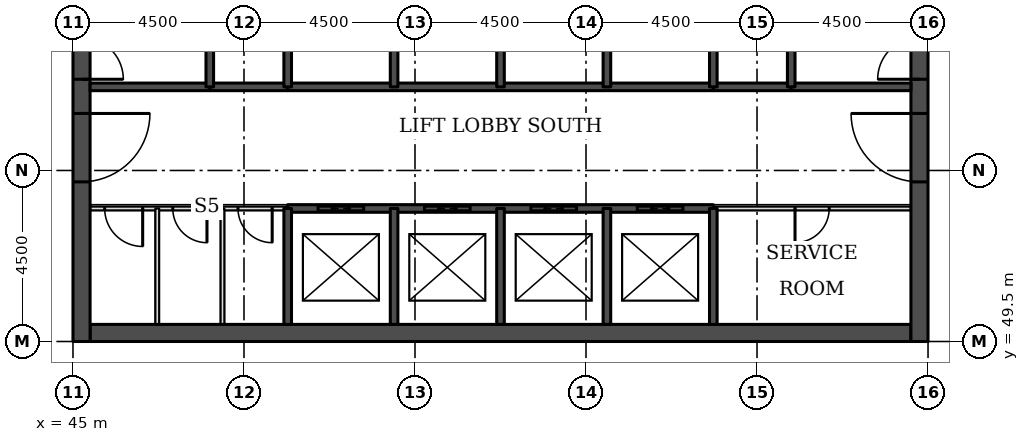
"""IFC4 building model, lengths in metres.
Left out: names, types, materials, properties, quantities, classifications, styles, units other than length and angle.
Written with IfcOpenShell. Run it as: python <this file> out.ifc"""

import sys

from ifc_helpers import new_model, si_unit, direction, frame, frame_2d, origin, place, context, subcontext, project, spatial, rectangle, extrude, element, fill, save


model = new_model("IFC4")
c1 = context("Model", 3, precision=1e-05, world=origin(), true_north=direction((0.0, 1.0)))
c2 = subcontext(c1, "Body", "Model", "MODEL_VIEW")
j1 = project(units=[si_unit("LENGTHUNIT", "METRE"), si_unit("PLANEANGLEUNIT", "RADIAN")], contexts=[c1])
p1 = place(None, origin())
s1 = spatial("IfcSite", under=j1, at=p1, CompositionType="ELEMENT")
p2 = place(p1, origin())
s2 = spatial("IfcBuilding", under=s1, at=p2, CompositionType="ELEMENT")
p3 = place(p2, frame((0.0, 0.0, 97.4)))
s3 = spatial("IfcBuildingStorey", under=s2, at=p3, CompositionType="ELEMENT", Elevation=97.4)
p4 = place(p3, frame((45.45, 49.725, 0.0), z_axis=(0.0, 0.0, 1.0), x_axis=(1.0, 0.0, 0.0)))
e1 = element("IfcWall", 1, at=p4, inside=s3, PredefinedType="SHEAR", context=c2, shape_type="SweptSolid", body=[
    extrude(rectangle(XDim=21.6, YDim=0.45, at=frame_2d((10.8, 0.0))), origin(), (0.0, 0.0, 1.0), 3.7),
])
p5 = place(p3, frame((45.225, 49.5, 0.0), z_axis=(0.0, 0.0, 1.0), x_axis=(0.0, 1.0, 0.0)))
e2 = element("IfcWall", 2, at=p5, inside=s3, PredefinedType="SHEAR", context=c2, shape_type="SweptSolid", body=[
    extrude(rectangle(XDim=22.5, YDim=0.45, at=frame_2d((11.25, 0.0))), origin(), (0.0, 0.0, 1.0), 3.7),
])
p6 = place(p5, frame((4.2, 0.0, 0.0)))
e3 = element("IfcOpeningElement", 3, at=p6, cuts=e2, PredefinedType="OPENING", context=c2, shape_type="SweptSolid", body=[
    extrude(rectangle(XDim=1.8, YDim=2.1, at=frame_2d((0.9, 1.05))), frame((0.0, 0.235, 0.0), z_axis=(0.0, -1.0, 0.0), x_axis=(1.0, 0.0, 0.0)), (0.0, 0.0, 1.0), 0.47),
])
p7 = place(p5, frame((6.9, 0.0, 0.0)))
e4 = element("IfcOpeningElement", 4, at=p7, cuts=e2, PredefinedType="OPENING", context=c2, shape_type="SweptSolid", body=[
    extrude(rectangle(XDim=1.1, YDim=2.1, at=frame_2d((0.55, 1.05))), frame((0.0, 0.235, 0.0), z_axis=(0.0, -1.0, 0.0), x_axis=(1.0, 0.0, 0.0)), (0.0, 0.0, 1.0), 0.47),
])
p8 = place(p5, frame((13.6, 0.0, 0.0)))
e5 = element("IfcOpeningElement", 5, at=p8, cuts=e2, PredefinedType="OPENING", context=c2, shape_type="SweptSolid", body=[
    extrude(rectangle(XDim=1.1, YDim=2.1, at=frame_2d((0.55, 1.05))), frame((0.0, 0.235, 0.0), z_axis=(0.0, -1.0, 0.0), x_axis=(1.0, 0.0, 0.0)), (0.0, 0.0, 1.0), 0.47),
])
p9 = place(p5, frame((16.5, 0.0, 0.0)))
e6 = element("IfcOpeningElement", 6, at=p9, cuts=e2, PredefinedType="OPENING", context=c2, shape_type="SweptSolid", body=[
    extrude(rectangle(XDim=1.8, YDim=2.1, at=frame_2d((0.9, 1.05))), frame((0.0, 0.235, 0.0), z_axis=(0.0, -1.0, 0.0), x_axis=(1.0, 0.0, 0.0)), (0.0, 0.0, 1.0), 0.47),
])
p10 = place(p3, frame((67.275, 49.5, 0.0), z_axis=(0.0, 0.0, 1.0), x_axis=(0.0, 1.0, 0.0)))
e7 = element("IfcWall", 7, at=p10, inside=s3, PredefinedType="SHEAR", context=c2, shape_type="SweptSolid", body=[
    extrude(rectangle(XDim=22.5, YDim=0.45, at=frame_2d((11.25, 0.0))), origin(), (0.0, 0.0, 1.0), 3.7),
])
p11 = place(p10, frame((4.2, 0.0, 0.0)))
e8 = element("IfcOpeningElement", 8, at=p11, cuts=e7, PredefinedType="OPENING", context=c2, shape_type="SweptSolid", body=[
    extrude(rectangle(XDim=1.8, YDim=2.1, at=frame_2d((0.9, 1.05))), frame((0.0, 0.235, 0.0), z_axis=(0.0, -1.0, 0.0), x_axis=(1.0, 0.0, 0.0)), (0.0, 0.0, 1.0), 0.47),
])
p12 = place(p10, frame((6.9, 0.0, 0.0)))
e9 = element("IfcOpeningElement", 9, at=p12, cuts=e7, PredefinedType="OPENING", context=c2, shape_type="SweptSolid", body=[
    extrude(rectangle(XDim=1.1, YDim=2.1, at=frame_2d((0.55, 1.05))), frame((0.0, 0.235, 0.0), z_axis=(0.0, -1.0, 0.0), x_axis=(1.0, 0.0, 0.0)), (0.0, 0.0, 1.0), 0.47),
])
p13 = place(p10, frame((13.6, 0.0, 0.0)))
e10 = element("IfcOpeningElement", 10, at=p13, cuts=e7, PredefinedType="OPENING", context=c2, shape_type="SweptSolid", body=[
    extrude(rectangle(XDim=1.1, YDim=2.1, at=frame_2d((0.55, 1.05))), frame((0.0, 0.235, 0.0), z_axis=(0.0, -1.0, 0.0), x_axis=(1.0, 0.0, 0.0)), (0.0, 0.0, 1.0), 0.47),
])
p14 = place(p10, frame((16.5, 0.0, 0.0)))
e11 = element("IfcOpeningElement", 11, at=p14, cuts=e7, PredefinedType="OPENING", context=c2, shape_type="SweptSolid", body=[
    extrude(rectangle(XDim=1.8, YDim=2.1, at=frame_2d((0.9, 1.05))), frame((0.0, 0.235, 0.0), z_axis=(0.0, -1.0, 0.0), x_axis=(1.0, 0.0, 0.0)), (0.0, 0.0, 1.0), 0.47),
])
p15 = place(p3, frame((45.45, 53.0, 0.0), z_axis=(0.0, 0.0, 1.0), x_axis=(1.0, 0.0, 0.0)))
e12 = element("IfcWall", 12, at=p15, inside=s3, PredefinedType="PARTITIONING", context=c2, shape_type="SweptSolid", body=[
    extrude(rectangle(XDim=5.2, YDim=0.1, at=frame_2d((2.6, 0.0))), origin(), (0.0, 0.0, 1.0), 3.55),
])
p16 = place(p15, frame((0.384, 0.0, 0.0)))
e13 = element("IfcOpeningElement", 13, at=p16, cuts=e12, PredefinedType="OPENING", context=c2, shape_type="SweptSolid", body=[
    extrude(rectangle(XDim=1.0, YDim=2.1, at=frame_2d((0.5, 1.05))), frame((0.0, 0.06, 0.0), z_axis=(0.0, -1.0, 0.0), x_axis=(1.0, 0.0, 0.0)), (0.0, 0.0, 1.0), 0.12),
])
p17 = place(p15, frame((2.176, 0.0, 0.0)))
e14 = element("IfcOpeningElement", 14, at=p17, cuts=e12, PredefinedType="OPENING", context=c2, shape_type="SweptSolid", body=[
    extrude(rectangle(XDim=0.9, YDim=2.1, at=frame_2d((0.45, 1.05))), frame((0.0, 0.06, 0.0), z_axis=(0.0, -1.0, 0.0), x_axis=(1.0, 0.0, 0.0)), (0.0, 0.0, 1.0), 0.12),
])
p18 = place(p15, frame((3.892, 0.0, 0.0)))
e15 = element("IfcOpeningElement", 15, at=p18, cuts=e12, PredefinedType="OPENING", context=c2, shape_type="SweptSolid", body=[
    extrude(rectangle(XDim=0.9, YDim=2.1, at=frame_2d((0.45, 1.05))), frame((0.0, 0.06, 0.0), z_axis=(0.0, -1.0, 0.0), x_axis=(1.0, 0.0, 0.0)), (0.0, 0.0, 1.0), 0.12),
])
p19 = place(p3, frame((61.85, 53.0, 0.0), z_axis=(0.0, 0.0, 1.0), x_axis=(1.0, 0.0, 0.0)))
e16 = element("IfcWall", 16, at=p19, inside=s3, PredefinedType="PARTITIONING", context=c2, shape_type="SweptSolid", body=[
    extrude(rectangle(XDim=5.2, YDim=0.1, at=frame_2d((2.6, 0.0))), origin(), (0.0, 0.0, 1.0), 3.55),
])
p20 = place(p19, frame((2.15, 0.0, 0.0)))
e17 = element("IfcOpeningElement", 17, at=p20, cuts=e16, PredefinedType="OPENING", context=c2, shape_type="SweptSolid", body=[
    extrude(rectangle(XDim=0.9, YDim=2.1, at=frame_2d((0.45, 1.05))), frame((0.0, 0.06, 0.0), z_axis=(0.0, -1.0, 0.0), x_axis=(1.0, 0.0, 0.0)), (0.0, 0.0, 1.0), 0.12),
])
p21 = place(p3, frame((50.65, 53.0, 0.0), z_axis=(0.0, 0.0, 1.0), x_axis=(1.0, 0.0, 0.0)))
e18 = element("IfcWall", 18, at=p21, inside=s3, PredefinedType="SOLIDWALL", context=c2, shape_type="SweptSolid", body=[
    extrude(rectangle(XDim=11.2, YDim=0.2, at=frame_2d((5.6, 0.0))), origin(), (0.0, 0.0, 1.0), 3.55),
])
p22 = place(p21, frame((0.8, 0.0, 0.0)))
e19 = element("IfcOpeningElement", 19, at=p22, cuts=e18, PredefinedType="OPENING", context=c2, shape_type="SweptSolid", body=[
    extrude(rectangle(XDim=1.2, YDim=2.1, at=frame_2d((0.6, 1.05))), frame((0.0, 0.11, 0.0), z_axis=(0.0, -1.0, 0.0), x_axis=(1.0, 0.0, 0.0)), (0.0, 0.0, 1.0), 0.22),
])
p23 = place(p21, frame((3.6, 0.0, 0.0)))
e20 = element("IfcOpeningElement", 20, at=p23, cuts=e18, PredefinedType="OPENING", context=c2, shape_type="SweptSolid", body=[
    extrude(rectangle(XDim=1.2, YDim=2.1, at=frame_2d((0.6, 1.05))), frame((0.0, 0.11, 0.0), z_axis=(0.0, -1.0, 0.0), x_axis=(1.0, 0.0, 0.0)), (0.0, 0.0, 1.0), 0.22),
])
p24 = place(p21, frame((6.4, 0.0, 0.0)))
e21 = element("IfcOpeningElement", 21, at=p24, cuts=e18, PredefinedType="OPENING", context=c2, shape_type="SweptSolid", body=[
    extrude(rectangle(XDim=1.2, YDim=2.1, at=frame_2d((0.6, 1.05))), frame((0.0, 0.11, 0.0), z_axis=(0.0, -1.0, 0.0), x_axis=(1.0, 0.0, 0.0)), (0.0, 0.0, 1.0), 0.22),
])
p25 = place(p21, frame((9.2, 0.0, 0.0)))
e22 = element("IfcOpeningElement", 22, at=p25, cuts=e18, PredefinedType="OPENING", context=c2, shape_type="SweptSolid", body=[
    extrude(rectangle(XDim=1.2, YDim=2.1, at=frame_2d((0.6, 1.05))), frame((0.0, 0.11, 0.0), z_axis=(0.0, -1.0, 0.0), x_axis=(1.0, 0.0, 0.0)), (0.0, 0.0, 1.0), 0.22),
])
for number, where, z_axis, x_axis in (
    (23, (48.6, 56.2, 0.0), (0.0, 0.0, 1.0), (1.0, 0.0, 0.0)),
    (24, (61.85, 56.2, 0.0), (0.0, 0.0, 1.0), (1.0, 0.0, 0.0)),
):
    element("IfcWall", number, at=place(p3, frame(where, z_axis=z_axis, x_axis=x_axis)), inside=s3, PredefinedType="SOLIDWALL", context=c2, shape_type="SweptSolid", body=[
        extrude(rectangle(XDim=2.05, YDim=0.2, at=frame_2d((1.025, 0.0))), origin(), (0.0, 0.0, 1.0), 3.55),
    ])
p26 = place(p3, frame((45.45, 56.2, 0.0), z_axis=(0.0, 0.0, 1.0), x_axis=(1.0, 0.0, 0.0)))
e25 = element("IfcWall", 25, at=p26, inside=s3, PredefinedType="SOLIDWALL", context=c2, shape_type="SweptSolid", body=[
    extrude(rectangle(XDim=3.15, YDim=0.2, at=frame_2d((1.575, 0.0))), origin(), (0.0, 0.0, 1.0), 3.55),
])
p27 = place(p3, frame((50.65, 56.2, 0.0), z_axis=(0.0, 0.0, 1.0), x_axis=(1.0, 0.0, 0.0)))
e26 = element("IfcWall", 26, at=p27, inside=s3, PredefinedType="SOLIDWALL", context=c2, shape_type="SweptSolid", body=[
    extrude(rectangle(XDim=11.2, YDim=0.2, at=frame_2d((5.6, 0.0))), origin(), (0.0, 0.0, 1.0), 3.55),
])
p28 = place(p3, frame((63.9, 56.2, 0.0), z_axis=(0.0, 0.0, 1.0), x_axis=(1.0, 0.0, 0.0)))
e27 = element("IfcWall", 27, at=p28, inside=s3, PredefinedType="SOLIDWALL", context=c2, shape_type="SweptSolid", body=[
    extrude(rectangle(XDim=3.15, YDim=0.2, at=frame_2d((1.575, 0.0))), origin(), (0.0, 0.0, 1.0), 3.55),
])
p29 = place(p3, frame((47.218, 49.95, 0.0), z_axis=(0.0, 0.0, 1.0), x_axis=(0.0, 1.0, 0.0)))
e28 = element("IfcWall", 28, at=p29, inside=s3, PredefinedType="PARTITIONING", context=c2, shape_type="SweptSolid", body=[
    extrude(rectangle(XDim=3.05, YDim=0.1, at=frame_2d((1.525, 0.0))), origin(), (0.0, 0.0, 1.0), 3.55),
])
p30 = place(p3, frame((48.6, 56.2, 0.0), z_axis=(0.0, 0.0, 1.0), x_axis=(0.0, 1.0, 0.0)))
e29 = element("IfcWall", 29, at=p30, inside=s3, PredefinedType="SOLIDWALL", context=c2, shape_type="SweptSolid", body=[
    extrude(rectangle(XDim=5.8, YDim=0.2, at=frame_2d((2.9, 0.0))), origin(), (0.0, 0.0, 1.0), 3.55),
])
p31 = place(p3, frame((48.934, 49.95, 0.0), z_axis=(0.0, 0.0, 1.0), x_axis=(0.0, 1.0, 0.0)))
e30 = element("IfcWall", 30, at=p31, inside=s3, PredefinedType="PARTITIONING", context=c2, shape_type="SweptSolid", body=[
    extrude(rectangle(XDim=3.05, YDim=0.1, at=frame_2d((1.525, 0.0))), origin(), (0.0, 0.0, 1.0), 3.55),
])
p32 = place(p3, frame((50.65, 49.95, 0.0), z_axis=(0.0, 0.0, 1.0), x_axis=(0.0, 1.0, 0.0)))
e31 = element("IfcWall", 31, at=p32, inside=s3, PredefinedType="SOLIDWALL", context=c2, shape_type="SweptSolid", body=[
    extrude(rectangle(XDim=3.05, YDim=0.2, at=frame_2d((1.525, 0.0))), origin(), (0.0, 0.0, 1.0), 3.55),
])
p33 = place(p3, frame((50.65, 56.2, 0.0), z_axis=(0.0, 0.0, 1.0), x_axis=(0.0, 1.0, 0.0)))
e32 = element("IfcWall", 32, at=p33, inside=s3, PredefinedType="SOLIDWALL", context=c2, shape_type="SweptSolid", body=[
    extrude(rectangle(XDim=2.8, YDim=0.2, at=frame_2d((1.4, 0.0))), origin(), (0.0, 0.0, 1.0), 3.55),
])
p34 = place(p3, frame((53.45, 49.95, 0.0), z_axis=(0.0, 0.0, 1.0), x_axis=(0.0, 1.0, 0.0)))
e33 = element("IfcWall", 33, at=p34, inside=s3, PredefinedType="SOLIDWALL", context=c2, shape_type="SweptSolid", body=[
    extrude(rectangle(XDim=3.05, YDim=0.2, at=frame_2d((1.525, 0.0))), origin(), (0.0, 0.0, 1.0), 3.55),
])
p35 = place(p3, frame((53.45, 56.2, 0.0), z_axis=(0.0, 0.0, 1.0), x_axis=(0.0, 1.0, 0.0)))
e34 = element("IfcWall", 34, at=p35, inside=s3, PredefinedType="SOLIDWALL", context=c2, shape_type="SweptSolid", body=[
    extrude(rectangle(XDim=2.8, YDim=0.2, at=frame_2d((1.4, 0.0))), origin(), (0.0, 0.0, 1.0), 3.55),
])
p36 = place(p3, frame((56.25, 49.95, 0.0), z_axis=(0.0, 0.0, 1.0), x_axis=(0.0, 1.0, 0.0)))
e35 = element("IfcWall", 35, at=p36, inside=s3, PredefinedType="SOLIDWALL", context=c2, shape_type="SweptSolid", body=[
    extrude(rectangle(XDim=3.05, YDim=0.2, at=frame_2d((1.525, 0.0))), origin(), (0.0, 0.0, 1.0), 3.55),
])
p37 = place(p3, frame((56.25, 56.2, 0.0), z_axis=(0.0, 0.0, 1.0), x_axis=(0.0, 1.0, 0.0)))
e36 = element("IfcWall", 36, at=p37, inside=s3, PredefinedType="SOLIDWALL", context=c2, shape_type="SweptSolid", body=[
    extrude(rectangle(XDim=2.8, YDim=0.2, at=frame_2d((1.4, 0.0))), origin(), (0.0, 0.0, 1.0), 3.55),
])
p38 = place(p3, frame((59.05, 49.95, 0.0), z_axis=(0.0, 0.0, 1.0), x_axis=(0.0, 1.0, 0.0)))
e37 = element("IfcWall", 37, at=p38, inside=s3, PredefinedType="SOLIDWALL", context=c2, shape_type="SweptSolid", body=[
    extrude(rectangle(XDim=3.05, YDim=0.2, at=frame_2d((1.525, 0.0))), origin(), (0.0, 0.0, 1.0), 3.55),
])
p39 = place(p3, frame((59.05, 56.2, 0.0), z_axis=(0.0, 0.0, 1.0), x_axis=(0.0, 1.0, 0.0)))
e38 = element("IfcWall", 38, at=p39, inside=s3, PredefinedType="SOLIDWALL", context=c2, shape_type="SweptSolid", body=[
    extrude(rectangle(XDim=2.8, YDim=0.2, at=frame_2d((1.4, 0.0))), origin(), (0.0, 0.0, 1.0), 3.55),
])
p40 = place(p3, frame((61.85, 49.95, 0.0), z_axis=(0.0, 0.0, 1.0), x_axis=(0.0, 1.0, 0.0)))
e39 = element("IfcWall", 39, at=p40, inside=s3, PredefinedType="SOLIDWALL", context=c2, shape_type="SweptSolid", body=[
    extrude(rectangle(XDim=3.05, YDim=0.2, at=frame_2d((1.525, 0.0))), origin(), (0.0, 0.0, 1.0), 3.55),
])
p41 = place(p3, frame((61.85, 56.2, 0.0), z_axis=(0.0, 0.0, 1.0), x_axis=(0.0, 1.0, 0.0)))
e40 = element("IfcWall", 40, at=p41, inside=s3, PredefinedType="SOLIDWALL", context=c2, shape_type="SweptSolid", body=[
    extrude(rectangle(XDim=2.8, YDim=0.2, at=frame_2d((1.4, 0.0))), origin(), (0.0, 0.0, 1.0), 3.55),
])
p42 = place(p3, frame((63.9, 56.2, 0.0), z_axis=(0.0, 0.0, 1.0), x_axis=(0.0, 1.0, 0.0)))
e41 = element("IfcWall", 41, at=p42, inside=s3, PredefinedType="SOLIDWALL", context=c2, shape_type="SweptSolid", body=[
    extrude(rectangle(XDim=5.8, YDim=0.2, at=frame_2d((2.9, 0.0))), origin(), (0.0, 0.0, 1.0), 3.55),
])
p43 = place(p22, origin())
e42 = element("IfcDoor", 42, at=p43, inside=s3, OperationType="DOUBLE_DOOR_SLIDING", PredefinedType="DOOR", context=c2, shape_type="SweptSolid", body=[
    extrude(rectangle(XDim=1.2, YDim=2.1, at=frame_2d((0.6, 1.05))), frame((0.0, 0.025, 0.0), z_axis=(0.0, -1.0, 0.0), x_axis=(1.0, 0.0, 0.0)), (0.0, 0.0, 1.0), 0.05),
])
fill(e19, e42)
p44 = place(p23, origin())
e43 = element("IfcDoor", 43, at=p44, inside=s3, OperationType="DOUBLE_DOOR_SLIDING", PredefinedType="DOOR", context=c2, shape_type="SweptSolid", body=[
    extrude(rectangle(XDim=1.2, YDim=2.1, at=frame_2d((0.6, 1.05))), frame((0.0, 0.025, 0.0), z_axis=(0.0, -1.0, 0.0), x_axis=(1.0, 0.0, 0.0)), (0.0, 0.0, 1.0), 0.05),
])
fill(e20, e43)
p45 = place(p24, origin())
e44 = element("IfcDoor", 44, at=p45, inside=s3, OperationType="DOUBLE_DOOR_SLIDING", PredefinedType="DOOR", context=c2, shape_type="SweptSolid", body=[
    extrude(rectangle(XDim=1.2, YDim=2.1, at=frame_2d((0.6, 1.05))), frame((0.0, 0.025, 0.0), z_axis=(0.0, -1.0, 0.0), x_axis=(1.0, 0.0, 0.0)), (0.0, 0.0, 1.0), 0.05),
])
fill(e21, e44)
p46 = place(p25, origin())
e45 = element("IfcDoor", 45, at=p46, inside=s3, OperationType="DOUBLE_DOOR_SLIDING", PredefinedType="DOOR", context=c2, shape_type="SweptSolid", body=[
    extrude(rectangle(XDim=1.2, YDim=2.1, at=frame_2d((0.6, 1.05))), frame((0.0, 0.025, 0.0), z_axis=(0.0, -1.0, 0.0), x_axis=(1.0, 0.0, 0.0)), (0.0, 0.0, 1.0), 0.05),
])
fill(e22, e45)
p47 = place(p6, frame((1.8, 0.0, 0.0), z_axis=(0.0, 0.0, 1.0), x_axis=(-1.0, 0.0, 0.0)))
e46 = element("IfcDoor", 46, at=p47, inside=s3, OperationType="SINGLE_SWING_LEFT", PredefinedType="DOOR", context=c2, shape_type="SweptSolid", body=[
    extrude(rectangle(XDim=1.8, YDim=2.1, at=frame_2d((0.9, 1.05))), frame((0.0, 0.025, 0.0), z_axis=(0.0, -1.0, 0.0), x_axis=(1.0, 0.0, 0.0)), (0.0, 0.0, 1.0), 0.05),
])
fill(e3, e46)
p48 = place(p7, frame((1.1, 0.0, 0.0), z_axis=(0.0, 0.0, 1.0), x_axis=(-1.0, 0.0, 0.0)))
e47 = element("IfcDoor", 47, at=p48, inside=s3, OperationType="SINGLE_SWING_RIGHT", PredefinedType="DOOR", context=c2, shape_type="SweptSolid", body=[
    extrude(rectangle(XDim=1.1, YDim=2.1, at=frame_2d((0.55, 1.05))), frame((0.0, 0.025, 0.0), z_axis=(0.0, -1.0, 0.0), x_axis=(1.0, 0.0, 0.0)), (0.0, 0.0, 1.0), 0.05),
])
fill(e4, e47)
p49 = place(p11, origin())
e48 = element("IfcDoor", 48, at=p49, inside=s3, OperationType="SINGLE_SWING_RIGHT", PredefinedType="DOOR", context=c2, shape_type="SweptSolid", body=[
    extrude(rectangle(XDim=1.8, YDim=2.1, at=frame_2d((0.9, 1.05))), frame((0.0, 0.025, 0.0), z_axis=(0.0, -1.0, 0.0), x_axis=(1.0, 0.0, 0.0)), (0.0, 0.0, 1.0), 0.05),
])
fill(e8, e48)
p50 = place(p12, origin())
e49 = element("IfcDoor", 49, at=p50, inside=s3, OperationType="SINGLE_SWING_LEFT", PredefinedType="DOOR", context=c2, shape_type="SweptSolid", body=[
    extrude(rectangle(XDim=1.1, YDim=2.1, at=frame_2d((0.55, 1.05))), frame((0.0, 0.025, 0.0), z_axis=(0.0, -1.0, 0.0), x_axis=(1.0, 0.0, 0.0)), (0.0, 0.0, 1.0), 0.05),
])
fill(e9, e49)
p51 = place(p20, frame((0.9, 0.0, 0.0), z_axis=(0.0, 0.0, 1.0), x_axis=(-1.0, 0.0, 0.0)))
e50 = element("IfcDoor", 50, at=p51, inside=s3, OperationType="SINGLE_SWING_RIGHT", PredefinedType="DOOR", context=c2, shape_type="SweptSolid", body=[
    extrude(rectangle(XDim=0.9, YDim=2.1, at=frame_2d((0.45, 1.05))), frame((0.0, 0.025, 0.0), z_axis=(0.0, -1.0, 0.0), x_axis=(1.0, 0.0, 0.0)), (0.0, 0.0, 1.0), 0.05),
])
fill(e17, e50)
p52 = place(p16, frame((1.0, 0.0, 0.0), z_axis=(0.0, 0.0, 1.0), x_axis=(-1.0, 0.0, 0.0)))
e51 = element("IfcDoor", 51, at=p52, inside=s3, OperationType="SINGLE_SWING_LEFT", PredefinedType="DOOR", context=c2, shape_type="SweptSolid", body=[
    extrude(rectangle(XDim=1.0, YDim=2.1, at=frame_2d((0.5, 1.05))), frame((0.0, 0.025, 0.0), z_axis=(0.0, -1.0, 0.0), x_axis=(1.0, 0.0, 0.0)), (0.0, 0.0, 1.0), 0.05),
])
fill(e13, e51)
p53 = place(p17, frame((0.9, 0.0, 0.0), z_axis=(0.0, 0.0, 1.0), x_axis=(-1.0, 0.0, 0.0)))
e52 = element("IfcDoor", 52, at=p53, inside=s3, OperationType="SINGLE_SWING_LEFT", PredefinedType="DOOR", context=c2, shape_type="SweptSolid", body=[
    extrude(rectangle(XDim=0.9, YDim=2.1, at=frame_2d((0.45, 1.05))), frame((0.0, 0.025, 0.0), z_axis=(0.0, -1.0, 0.0), x_axis=(1.0, 0.0, 0.0)), (0.0, 0.0, 1.0), 0.05),
])
fill(e14, e52)
p54 = place(p18, frame((0.9, 0.0, 0.0), z_axis=(0.0, 0.0, 1.0), x_axis=(-1.0, 0.0, 0.0)))
e53 = element("IfcDoor", 53, at=p54, inside=s3, OperationType="SINGLE_SWING_LEFT", PredefinedType="DOOR", context=c2, shape_type="SweptSolid", body=[
    extrude(rectangle(XDim=0.9, YDim=2.1, at=frame_2d((0.45, 1.05))), frame((0.0, 0.025, 0.0), z_axis=(0.0, -1.0, 0.0), x_axis=(1.0, 0.0, 0.0)), (0.0, 0.0, 1.0), 0.05),
])
fill(e15, e53)
save(model, sys.argv[1])
